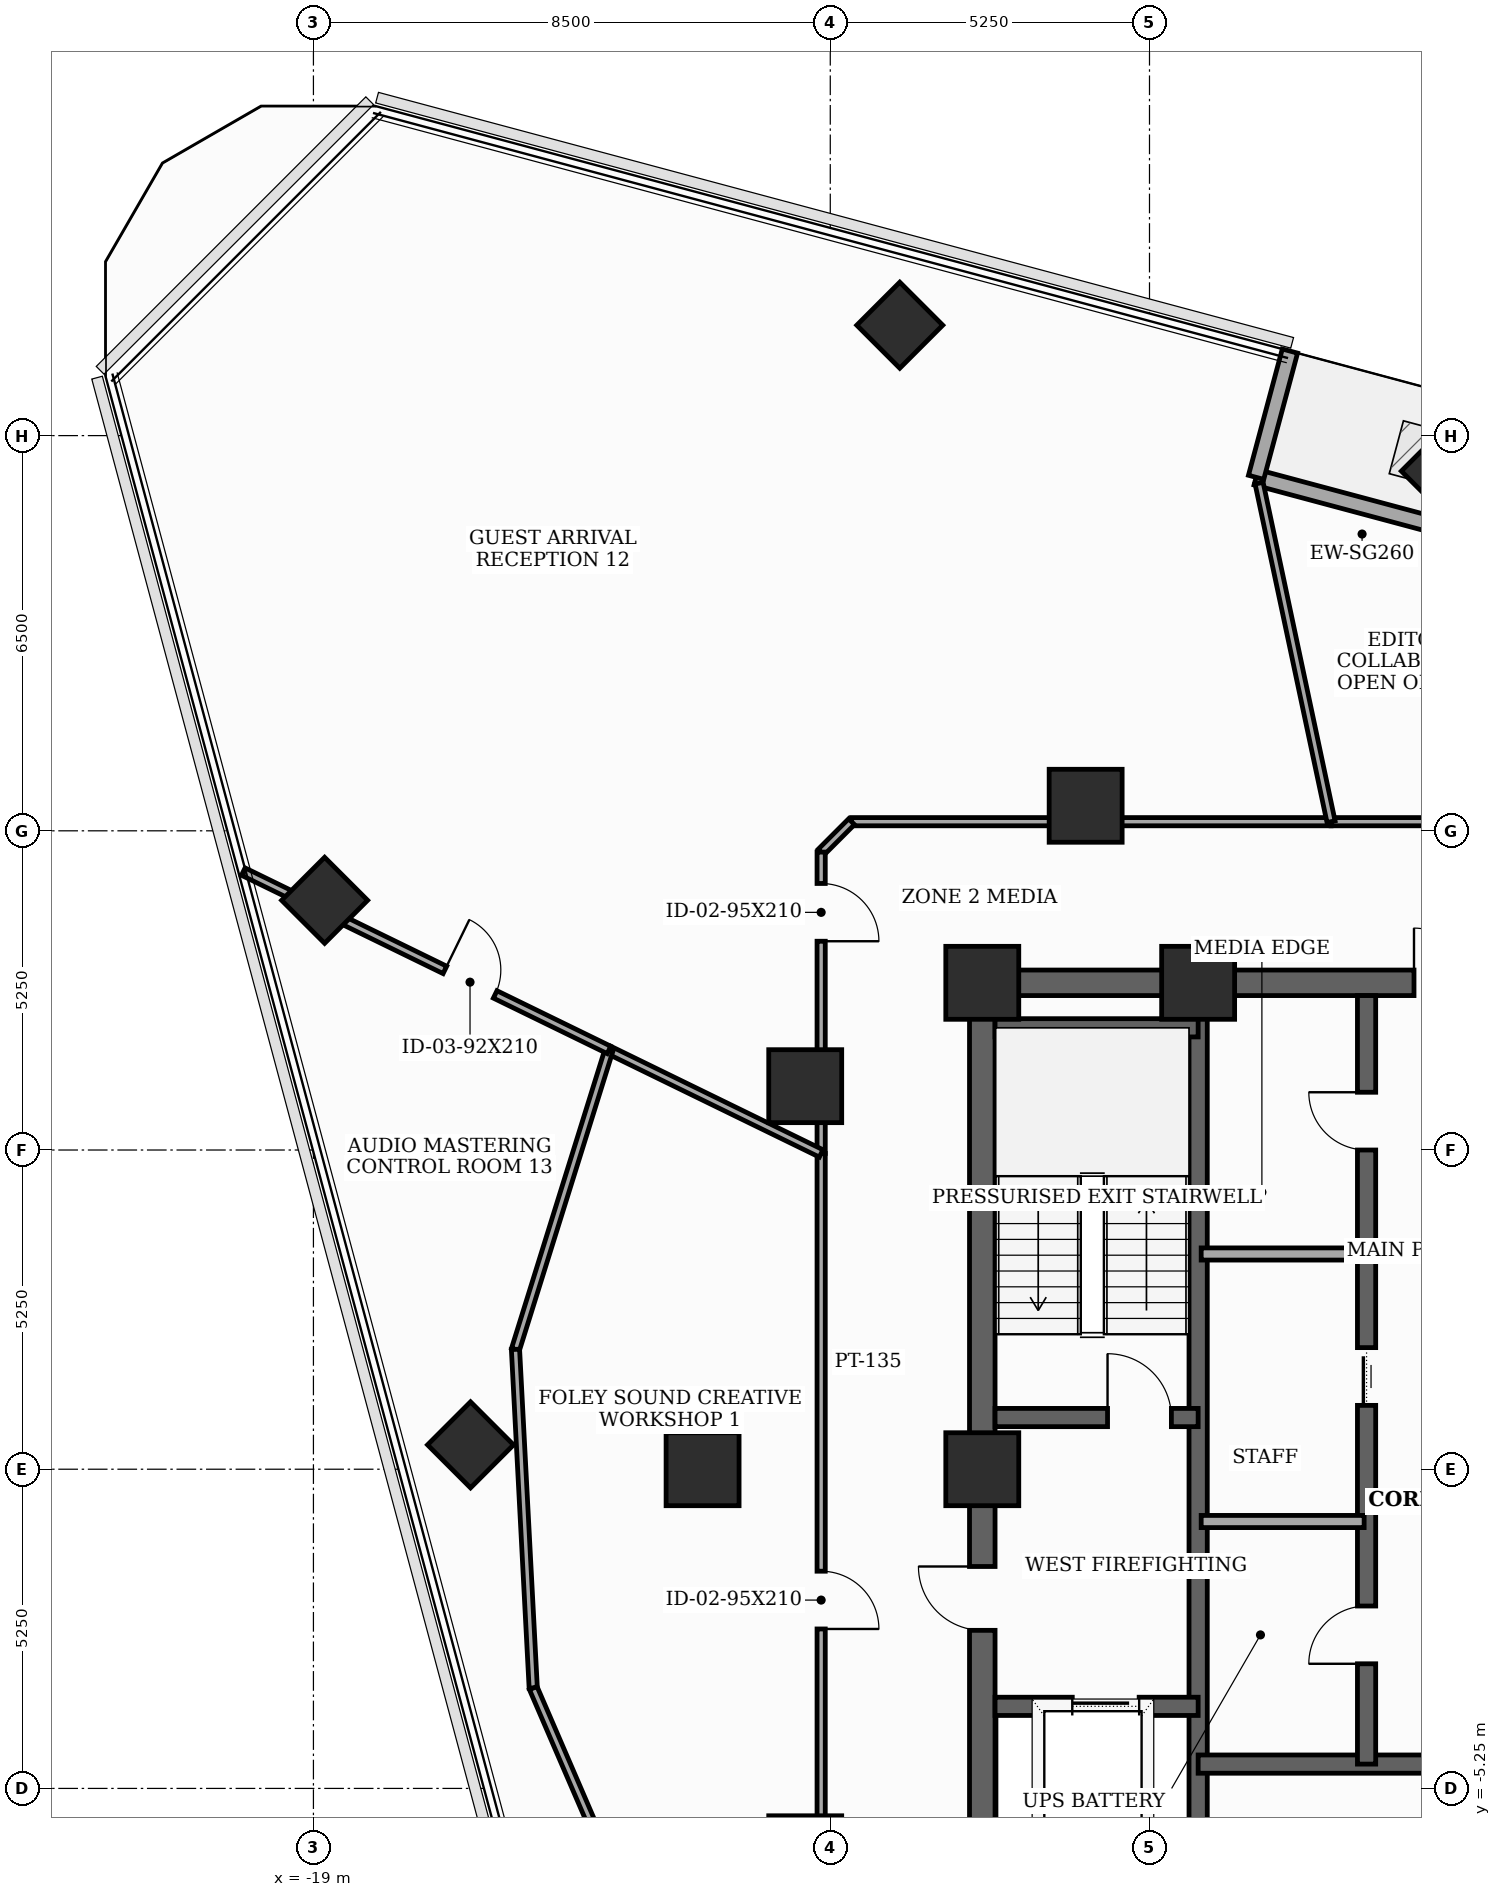
"""IFC4 building model, lengths in metres.
Left out: names, types, materials, properties, quantities, classifications, styles, units other than length and angle.
Written with IfcOpenShell. Run it as: python <this file> out.ifc"""

import sys

from ifc_helpers import new_model, si_unit, direction, frame, frame_2d, origin, origin_2d, place, context, subcontext, project, spatial, rectangle, extrude, element, fill, save


model = new_model("IFC4")
c1 = context("Model", 3, precision=1e-05, world=origin(), true_north=direction((0.0, 1.0)))
c2 = subcontext(c1, "Body", "Model", "MODEL_VIEW")
j1 = project(units=[si_unit("LENGTHUNIT", "METRE"), si_unit("PLANEANGLEUNIT", "RADIAN")], contexts=[c1])
p1 = place(None, origin())
s1 = spatial("IfcSite", under=j1, at=p1, CompositionType="ELEMENT")
p2 = place(p1, origin())
s2 = spatial("IfcBuilding", under=s1, at=p2, CompositionType="ELEMENT")
p3 = place(p2, frame((0.0, 0.0, 191.6)))
s3 = spatial("IfcBuildingStorey", under=s2, at=p3, CompositionType="ELEMENT", Elevation=191.6)
for number, where, z_axis, x_axis in (
    (1, (-4.45, 8.0, 0.0), (0.0, 0.0, 1.0), (1.0, 0.0, 0.0)),
    (2, (-8.0, 8.0, 0.0), (0.0, 0.0, 1.0), (1.0, 0.0, 0.0)),
    (3, (-8.0, 0.0, 0.0), (0.0, 0.0, 1.0), (1.0, 0.0, 0.0)),
    (4, (-6.3, 10.912, 0.0), (0.0, 0.0, 1.0), (1.0, 0.0, 0.0)),
    (5, (-10.912, 6.3, 0.0), (0.0, 0.0, 1.0), (1.0, 0.0, 0.0)),
    (6, (-12.6, 0.0, 0.0), (0.0, 0.0, 1.0), (1.0, 0.0, 0.0)),
    (7, (-10.912, -6.3, 0.0), (0.0, 0.0, 1.0), (1.0, 0.0, 0.0)),
):
    element("IfcColumn", number, at=place(p3, frame(where, z_axis=z_axis, x_axis=x_axis)), inside=s3, PredefinedType="COLUMN", context=c2, shape_type="SweptSolid", body=[
        extrude(rectangle(XDim=1.2, YDim=1.2, at=origin_2d()), origin(), (0.0, 0.0, 1.0), 3.7),
    ])
for number, where, z_axis, x_axis in (
    (8, (-0.401, 16.416, 0.0), (0.0, 0.0, 1.0), (0.707, 0.707, 0.0)),
    (9, (-9.357, 18.816, 0.0), (0.0, 0.0, 1.0), (0.707, 0.707, 0.0)),
    (10, (-18.816, 9.357, 0.0), (0.0, 0.0, 1.0), (0.707, 0.707, 0.0)),
    (11, (-16.416, 0.401, 0.0), (0.0, 0.0, 1.0), (0.707, 0.707, 0.0)),
):
    element("IfcColumn", number, at=place(p3, frame(where, z_axis=z_axis, x_axis=x_axis)), inside=s3, PredefinedType="COLUMN", context=c2, shape_type="SweptSolid", body=[
        extrude(rectangle(XDim=1.0, YDim=1.0, at=origin_2d()), origin(), (0.0, 0.0, 1.0), 3.7),
    ])
p4 = place(p3, frame((6.935, 13.519, 0.0), z_axis=(0.0, 0.0, 1.0), x_axis=(-0.965922825334, 0.258830244561, 0.0)))
e12 = element("IfcWall", 12, at=p4, inside=s3, PredefinedType="SOLIDWALL", context=c2, shape_type="SweptSolid", body=[
    extrude(rectangle(XDim=10.8, YDim=0.26, at=frame_2d((5.4, 0.0))), origin(), (0.0, 0.0, 1.0), 3.5),
])
p5 = place(p4, frame((1.75, 0.0, 0.0)))
e13 = element("IfcOpeningElement", 13, at=p5, cuts=e12, PredefinedType="OPENING", context=c2, shape_type="SweptSolid", body=[
    extrude(rectangle(XDim=1.6, YDim=2.08, at=frame_2d((0.8, 1.04))), frame((0.0, 0.14, 0.0), z_axis=(0.0, -1.0, 0.0), x_axis=(1.0, 0.0, 0.0)), (0.0, 0.0, 1.0), 0.28),
])
p6 = place(p4, frame((5.65, 0.0, 0.85)))
e14 = element("IfcOpeningElement", 14, at=p6, cuts=e12, PredefinedType="OPENING", context=c2, shape_type="SweptSolid", body=[
    extrude(rectangle(XDim=1.3, YDim=1.25, at=frame_2d((0.65, 0.625))), frame((0.0, 0.14, 0.0), z_axis=(0.0, -1.0, 0.0), x_axis=(1.0, 0.0, 0.0)), (0.0, 0.0, 1.0), 0.28),
])
p7 = place(p3, frame((-3.497, 16.314, 0.0), z_axis=(0.0, 0.0, 1.0), x_axis=(0.258800415469, 0.965930817892, 0.0)))
e15 = element("IfcWall", 15, at=p7, inside=s3, PredefinedType="SOLIDWALL", context=c2, shape_type="SweptSolid", body=[
    extrude(rectangle(XDim=2.15, YDim=0.26, at=frame_2d((1.075, 0.0))), origin(), (0.0, 0.0, 1.0), 3.5),
])
p8 = place(p3, frame((-8.0, -8.0, 0.0), z_axis=(0.0, 0.0, 1.0), x_axis=(0.0, 1.0, 0.0)))
e16 = element("IfcWall", 16, at=p8, inside=s3, PredefinedType="SHEAR", context=c2, shape_type="SweptSolid", body=[
    extrude(rectangle(XDim=16.0, YDim=0.42, at=frame_2d((8.0, 0.0))), origin(), (0.0, 0.0, 1.0), 3.5),
])
p9 = place(p8, frame((0.761, 0.0, 0.0)))
e17 = element("IfcOpeningElement", 17, at=p9, cuts=e16, PredefinedType="OPENING", context=c2, shape_type="SweptSolid", body=[
    extrude(rectangle(XDim=0.85, YDim=2.02, at=frame_2d((0.425, 1.01))), frame((0.0, 0.22, 0.0), z_axis=(0.0, -1.0, 0.0), x_axis=(1.0, 0.0, 0.0)), (0.0, 0.0, 1.0), 0.44),
])
p10 = place(p8, frame((5.35, 0.0, 0.0)))
e18 = element("IfcOpeningElement", 18, at=p10, cuts=e16, PredefinedType="OPENING", context=c2, shape_type="SweptSolid", body=[
    extrude(rectangle(XDim=1.05, YDim=2.15, at=frame_2d((0.525, 1.075))), frame((0.0, 0.22, 0.0), z_axis=(0.0, -1.0, 0.0), x_axis=(1.0, 0.0, 0.0)), (0.0, 0.0, 1.0), 0.44),
])
p11 = place(p3, frame((-8.0, 8.0, 0.0), z_axis=(0.0, 0.0, 1.0), x_axis=(1.0, 0.0, 0.0)))
e19 = element("IfcWall", 19, at=p11, inside=s3, PredefinedType="SHEAR", context=c2, shape_type="SweptSolid", body=[
    extrude(rectangle(XDim=16.0, YDim=0.42, at=frame_2d((8.0, 0.0))), origin(), (0.0, 0.0, 1.0), 3.5),
])
p12 = place(p11, frame((7.1, 0.0, 0.0)))
e20 = element("IfcOpeningElement", 20, at=p12, cuts=e19, PredefinedType="OPENING", context=c2, shape_type="SweptSolid", body=[
    extrude(rectangle(XDim=1.8, YDim=2.15, at=frame_2d((0.9, 1.075))), frame((0.0, 0.22, 0.0), z_axis=(0.0, -1.0, 0.0), x_axis=(1.0, 0.0, 0.0)), (0.0, 0.0, 1.0), 0.44),
])
p13 = place(p3, frame((-4.45, -7.79, 0.0), z_axis=(0.0, 0.0, 1.0), x_axis=(0.0, 1.0, 0.0)))
e21 = element("IfcWall", 21, at=p13, inside=s3, PredefinedType="SHEAR", context=c2, shape_type="SweptSolid", body=[
    extrude(rectangle(XDim=15.58, YDim=0.3, at=frame_2d((7.79, 0.0))), origin(), (0.0, 0.0, 1.0), 3.5),
])
p14 = place(p3, frame((-7.79, 0.85, 0.0), z_axis=(0.0, 0.0, 1.0), x_axis=(1.0, 0.0, 0.0)))
e22 = element("IfcWall", 22, at=p14, inside=s3, PredefinedType="SHEAR", context=c2, shape_type="SweptSolid", body=[
    extrude(rectangle(XDim=3.34, YDim=0.3, at=frame_2d((1.67, 0.0))), origin(), (0.0, 0.0, 1.0), 3.5),
])
p15 = place(p14, frame((1.85, 0.0, 0.0)))
e23 = element("IfcOpeningElement", 23, at=p15, cuts=e22, PredefinedType="OPENING", context=c2, shape_type="SweptSolid", body=[
    extrude(rectangle(XDim=1.05, YDim=2.15, at=frame_2d((0.525, 1.075))), frame((0.0, 0.16, 0.0), z_axis=(0.0, -1.0, 0.0), x_axis=(1.0, 0.0, 0.0)), (0.0, 0.0, 1.0), 0.32),
])
p16 = place(p3, frame((-7.79, 7.26, 0.0), z_axis=(0.0, 0.0, 1.0), x_axis=(1.0, 0.0, 0.0)))
e24 = element("IfcWall", 24, at=p16, inside=s3, PredefinedType="SHEAR", context=c2, shape_type="SweptSolid", body=[
    extrude(rectangle(XDim=3.34, YDim=0.3, at=frame_2d((1.67, 0.0))), origin(), (0.0, 0.0, 1.0), 3.5),
])
p17 = place(p3, frame((-7.79, -3.9, 0.0), z_axis=(0.0, 0.0, 1.0), x_axis=(1.0, 0.0, 0.0)))
e25 = element("IfcWall", 25, at=p17, inside=s3, PredefinedType="SHEAR", context=c2, shape_type="SweptSolid", body=[
    extrude(rectangle(XDim=3.34, YDim=0.3, at=frame_2d((1.67, 0.0))), origin(), (0.0, 0.0, 1.0), 3.5),
])
p18 = place(p17, frame((1.27, 0.0, 0.0)))
e26 = element("IfcOpeningElement", 26, at=p18, cuts=e25, PredefinedType="OPENING", context=c2, shape_type="SweptSolid", body=[
    extrude(rectangle(XDim=1.1, YDim=2.1, at=frame_2d((0.55, 1.05))), frame((0.0, 0.16, 0.0), z_axis=(0.0, -1.0, 0.0), x_axis=(1.0, 0.0, 0.0)), (0.0, 0.0, 1.0), 0.32),
])
p19 = place(p3, frame((-4.45, -4.85, 0.0), z_axis=(0.0, 0.0, 1.0), x_axis=(1.0, 0.0, 0.0)))
e27 = element("IfcWall", 27, at=p19, inside=s3, PredefinedType="SHEAR", context=c2, shape_type="SweptSolid", body=[
    extrude(rectangle(XDim=8.9, YDim=0.3, at=frame_2d((4.45, 0.0))), origin(), (0.0, 0.0, 1.0), 3.5),
])
p20 = place(p3, frame((-1.68, -4.85, 0.0), z_axis=(0.0, 0.0, 1.0), x_axis=(0.0, 1.0, 0.0)))
e28 = element("IfcWall", 28, at=p20, inside=s3, PredefinedType="SHEAR", context=c2, shape_type="SweptSolid", body=[
    extrude(rectangle(XDim=12.64, YDim=0.3, at=frame_2d((6.32, 0.0))), origin(), (0.0, 0.0, 1.0), 3.5),
])
p21 = place(p20, frame((1.65, 0.0, 0.0)))
e29 = element("IfcOpeningElement", 29, at=p21, cuts=e28, PredefinedType="OPENING", context=c2, shape_type="SweptSolid", body=[
    extrude(rectangle(XDim=0.95, YDim=2.1, at=frame_2d((0.475, 1.05))), frame((0.0, 0.16, 0.0), z_axis=(0.0, -1.0, 0.0), x_axis=(1.0, 0.0, 0.0)), (0.0, 0.0, 1.0), 0.32),
])
p22 = place(p20, frame((5.9, 0.0, 0.0)))
e30 = element("IfcOpeningElement", 30, at=p22, cuts=e28, PredefinedType="OPENING", context=c2, shape_type="SweptSolid", body=[
    extrude(rectangle(XDim=0.95, YDim=2.1, at=frame_2d((0.475, 1.05))), frame((0.0, 0.16, 0.0), z_axis=(0.0, -1.0, 0.0), x_axis=(1.0, 0.0, 0.0)), (0.0, 0.0, 1.0), 0.32),
])
p23 = place(p20, frame((10.1, 0.0, 0.0)))
e31 = element("IfcOpeningElement", 31, at=p23, cuts=e28, PredefinedType="OPENING", context=c2, shape_type="SweptSolid", body=[
    extrude(rectangle(XDim=0.95, YDim=2.1, at=frame_2d((0.475, 1.05))), frame((0.0, 0.16, 0.0), z_axis=(0.0, -1.0, 0.0), x_axis=(1.0, 0.0, 0.0)), (0.0, 0.0, 1.0), 0.32),
])
for number, where, z_axis, x_axis in (
    (32, (-4.4, -0.86, 0.0), (0.0, 0.0, 1.0), (1.0, 0.0, 0.0)),
    (33, (-4.4, 3.54, 0.0), (0.0, 0.0, 1.0), (1.0, 0.0, 0.0)),
):
    element("IfcWall", number, at=place(p3, frame(where, z_axis=z_axis, x_axis=x_axis)), inside=s3, PredefinedType="SOLIDWALL", context=c2, shape_type="SweptSolid", body=[
        extrude(rectangle(XDim=2.68, YDim=0.2, at=frame_2d((1.34, 0.0))), origin(), (0.0, 0.0, 1.0), 3.5),
    ])
p24 = place(p3, frame((-10.65, 5.194, 0.0), z_axis=(0.0, 0.0, 1.0), x_axis=(0.0, -1.0, 0.0)))
e34 = element("IfcWall", 34, at=p24, inside=s3, PredefinedType="PARTITIONING", context=c2, shape_type="SweptSolid", body=[
    extrude(rectangle(XDim=11.849, YDim=0.135, at=frame_2d((5.925, 0.0))), origin(), (0.0, 0.0, 1.0), 2.885),
])
p25 = place(p24, frame((6.871, 0.0, 0.0)))
e35 = element("IfcOpeningElement", 35, at=p25, cuts=e34, PredefinedType="OPENING", context=c2, shape_type="SweptSolid", body=[
    extrude(rectangle(XDim=0.95, YDim=2.1, at=frame_2d((0.475, 1.05))), frame((0.0, 0.077, 0.0), z_axis=(0.0, -1.0, 0.0), x_axis=(1.0, 0.0, 0.0)), (0.0, 0.0, 1.0), 0.155),
])
p26 = place(p3, frame((4.742, 10.65, 0.0), z_axis=(0.0, 0.0, 1.0), x_axis=(-1.0, 0.0, 0.0)))
e36 = element("IfcWall", 36, at=p26, inside=s3, PredefinedType="PARTITIONING", context=c2, shape_type="SweptSolid", body=[
    extrude(rectangle(XDim=7.006, YDim=0.135, at=frame_2d((3.503, 0.0))), origin(), (0.0, 0.0, 1.0), 2.885),
])
p27 = place(p26, frame((3.028, 0.0, 0.0)))
e37 = element("IfcOpeningElement", 37, at=p27, cuts=e36, PredefinedType="OPENING", context=c2, shape_type="SweptSolid", body=[
    extrude(rectangle(XDim=0.95, YDim=2.1, at=frame_2d((0.475, 1.05))), frame((0.0, 0.077, 0.0), z_axis=(0.0, -1.0, 0.0), x_axis=(1.0, 0.0, 0.0)), (0.0, 0.0, 1.0), 0.155),
])
p28 = place(p3, frame((-2.264, 10.65, 0.0), z_axis=(0.0, 0.0, 1.0), x_axis=(-1.0, 0.0, 0.0)))
e38 = element("IfcWall", 38, at=p28, inside=s3, PredefinedType="PARTITIONING", context=c2, shape_type="SweptSolid", body=[
    extrude(rectangle(XDim=7.886, YDim=0.135, at=frame_2d((3.943, 0.0))), origin(), (0.0, 0.0, 1.0), 2.885),
])
p29 = place(p3, frame((-10.15, 10.65, 0.0), z_axis=(0.0, 0.0, 1.0), x_axis=(-0.707106781187, -0.707106781187, 0.0)))
e39 = element("IfcWall", 39, at=p29, inside=s3, PredefinedType="PARTITIONING", context=c2, shape_type="SweptSolid", body=[
    extrude(rectangle(XDim=0.707, YDim=0.135, at=frame_2d((0.354, 0.0))), origin(), (0.0, 0.0, 1.0), 3.5),
])
p30 = place(p3, frame((-10.65, 10.15, 0.0), z_axis=(0.0, 0.0, 1.0), x_axis=(0.0, -1.0, 0.0)))
e40 = element("IfcWall", 40, at=p30, inside=s3, PredefinedType="PARTITIONING", context=c2, shape_type="SweptSolid", body=[
    extrude(rectangle(XDim=4.956, YDim=0.135, at=frame_2d((2.478, 0.0))), origin(), (0.0, 0.0, 1.0), 2.885),
])
p31 = place(p30, frame((0.516, 0.0, 0.0)))
e41 = element("IfcOpeningElement", 41, at=p31, cuts=e40, PredefinedType="OPENING", context=c2, shape_type="SweptSolid", body=[
    extrude(rectangle(XDim=0.95, YDim=2.1, at=frame_2d((0.475, 1.05))), frame((0.0, 0.077, 0.0), z_axis=(0.0, -1.0, 0.0), x_axis=(1.0, 0.0, 0.0)), (0.0, 0.0, 1.0), 0.155),
])
p32 = place(p3, frame((-10.65, 5.194, 0.0), z_axis=(0.0, 0.0, 1.0), x_axis=(-0.898773885441, 0.438412480261, 0.0)))
e42 = element("IfcWall", 42, at=p32, inside=s3, PredefinedType="PARTITIONING", context=c2, shape_type="SweptSolid", body=[
    extrude(rectangle(XDim=3.882, YDim=0.135, at=frame_2d((1.941, 0.0))), origin(), (0.0, 0.0, 1.0), 2.885),
])
p33 = place(p3, frame((-14.139, 6.896, 0.0), z_axis=(0.0, 0.0, 1.0), x_axis=(-0.298099863076, -0.954534688544, 0.0)))
e43 = element("IfcWall", 43, at=p33, inside=s3, PredefinedType="PARTITIONING", context=c2, shape_type="SweptSolid", body=[
    extrude(rectangle(XDim=5.16, YDim=0.135, at=frame_2d((2.58, 0.0))), origin(), (0.0, 0.0, 1.0), 3.5),
])
p34 = place(p3, frame((-15.677, 1.971, 0.0), z_axis=(0.0, 0.0, 1.0), x_axis=(0.052349772407, -0.998628810584, 0.0)))
e44 = element("IfcWall", 44, at=p34, inside=s3, PredefinedType="PARTITIONING", context=c2, shape_type="SweptSolid", body=[
    extrude(rectangle(XDim=5.578, YDim=0.135, at=frame_2d((2.789, 0.0))), origin(), (0.0, 0.0, 1.0), 2.985),
])
p35 = place(p3, frame((-15.385, -3.599, 0.0), z_axis=(0.0, 0.0, 1.0), x_axis=(0.396191247476, -0.918168010455, 0.0)))
e45 = element("IfcWall", 45, at=p35, inside=s3, PredefinedType="PARTITIONING", context=c2, shape_type="SweptSolid", body=[
    extrude(rectangle(XDim=5.159, YDim=0.135, at=frame_2d((2.58, 0.0))), origin(), (0.0, 0.0, 1.0), 2.985),
])
p36 = place(p3, frame((-3.447, 16.218, 0.0), z_axis=(0.0, 0.0, 1.0), x_axis=(0.207888507592, -0.978152528193, 0.0)))
e46 = element("IfcWall", 46, at=p36, inside=s3, PredefinedType="PARTITIONING", context=c2, shape_type="SweptSolid", body=[
    extrude(rectangle(XDim=5.692, YDim=0.135, at=frame_2d((2.846, 0.0))), origin(), (0.0, 0.0, 1.0), 2.885),
])
p37 = place(p3, frame((-20.154, 9.829, 0.0), z_axis=(0.0, 0.0, 1.0), x_axis=(0.898812268895, -0.43833378296, 0.0)))
e47 = element("IfcWall", 47, at=p37, inside=s3, PredefinedType="PARTITIONING", context=c2, shape_type="SweptSolid", body=[
    extrude(rectangle(XDim=6.692, YDim=0.135, at=frame_2d((3.346, 0.0))), origin(), (0.0, 0.0, 1.0), 2.985),
])
p38 = place(p37, frame((3.689, 0.0, 0.0)))
e48 = element("IfcOpeningElement", 48, at=p38, cuts=e47, PredefinedType="OPENING", context=c2, shape_type="SweptSolid", body=[
    extrude(rectangle(XDim=0.92, YDim=2.1, at=frame_2d((0.46, 1.05))), frame((0.0, 0.077, 0.0), z_axis=(0.0, -1.0, 0.0), x_axis=(1.0, 0.0, 0.0)), (0.0, 0.0, 1.0), 0.155),
])
p39 = place(p10, origin())
e49 = element("IfcDoor", 49, at=p39, inside=s3, OperationType="SINGLE_SWING_RIGHT", PredefinedType="DOOR", context=c2, shape_type="SweptSolid", body=[
    extrude(rectangle(XDim=1.05, YDim=2.15, at=frame_2d((0.525, 1.075))), frame((0.0, 0.025, 0.0), z_axis=(0.0, -1.0, 0.0), x_axis=(1.0, 0.0, 0.0)), (0.0, 0.0, 1.0), 0.05),
])
fill(e18, e49)
p40 = place(p12, origin())
e50 = element("IfcDoor", 50, at=p40, inside=s3, OperationType="DOUBLE_DOOR_SINGLE_SWING", PredefinedType="DOOR", context=c2, shape_type="SweptSolid", body=[
    extrude(rectangle(XDim=1.8, YDim=2.15, at=frame_2d((0.9, 1.075))), frame((0.0, 0.025, 0.0), z_axis=(0.0, -1.0, 0.0), x_axis=(1.0, 0.0, 0.0)), (0.0, 0.0, 1.0), 0.05),
])
fill(e20, e50)
p41 = place(p15, origin())
e51 = element("IfcDoor", 51, at=p41, inside=s3, OperationType="SINGLE_SWING_LEFT", PredefinedType="DOOR", context=c2, shape_type="SweptSolid", body=[
    extrude(rectangle(XDim=1.05, YDim=2.15, at=frame_2d((0.525, 1.075))), frame((0.0, 0.025, 0.0), z_axis=(0.0, -1.0, 0.0), x_axis=(1.0, 0.0, 0.0)), (0.0, 0.0, 1.0), 0.05),
])
fill(e23, e51)
p42 = place(p18, origin())
e52 = element("IfcDoor", 52, at=p42, inside=s3, OperationType="SLIDING_TO_LEFT", PredefinedType="DOOR", context=c2, shape_type="SweptSolid", body=[
    extrude(rectangle(XDim=1.1, YDim=2.1, at=frame_2d((0.55, 1.05))), frame((0.0, 0.025, 0.0), z_axis=(0.0, -1.0, 0.0), x_axis=(1.0, 0.0, 0.0)), (0.0, 0.0, 1.0), 0.05),
])
fill(e26, e52)
p43 = place(p21, origin())
e53 = element("IfcDoor", 53, at=p43, inside=s3, OperationType="SINGLE_SWING_LEFT", PredefinedType="DOOR", context=c2, shape_type="SweptSolid", body=[
    extrude(rectangle(XDim=0.95, YDim=2.1, at=frame_2d((0.475, 1.05))), frame((0.0, 0.025, 0.0), z_axis=(0.0, -1.0, 0.0), x_axis=(1.0, 0.0, 0.0)), (0.0, 0.0, 1.0), 0.05),
])
fill(e29, e53)
p44 = place(p22, origin())
e54 = element("IfcDoor", 54, at=p44, inside=s3, OperationType="SLIDING_TO_LEFT", PredefinedType="DOOR", context=c2, shape_type="SweptSolid", body=[
    extrude(rectangle(XDim=0.95, YDim=2.1, at=frame_2d((0.475, 1.05))), frame((0.0, 0.025, 0.0), z_axis=(0.0, -1.0, 0.0), x_axis=(1.0, 0.0, 0.0)), (0.0, 0.0, 1.0), 0.05),
])
fill(e30, e54)
p45 = place(p23, origin())
e55 = element("IfcDoor", 55, at=p45, inside=s3, OperationType="SINGLE_SWING_RIGHT", PredefinedType="DOOR", context=c2, shape_type="SweptSolid", body=[
    extrude(rectangle(XDim=0.95, YDim=2.1, at=frame_2d((0.475, 1.05))), frame((0.0, 0.025, 0.0), z_axis=(0.0, -1.0, 0.0), x_axis=(1.0, 0.0, 0.0)), (0.0, 0.0, 1.0), 0.05),
])
fill(e31, e55)
p46 = place(p25, origin())
e56 = element("IfcDoor", 56, at=p46, inside=s3, OperationType="SINGLE_SWING_RIGHT", PredefinedType="DOOR", context=c2, shape_type="SweptSolid", body=[
    extrude(rectangle(XDim=0.95, YDim=2.1, at=frame_2d((0.475, 1.05))), frame((0.0, 0.025, 0.0), z_axis=(0.0, -1.0, 0.0), x_axis=(1.0, 0.0, 0.0)), (0.0, 0.0, 1.0), 0.05),
])
fill(e35, e56)
p47 = place(p31, origin())
e57 = element("IfcDoor", 57, at=p47, inside=s3, OperationType="SINGLE_SWING_RIGHT", PredefinedType="DOOR", context=c2, shape_type="SweptSolid", body=[
    extrude(rectangle(XDim=0.95, YDim=2.1, at=frame_2d((0.475, 1.05))), frame((0.0, 0.025, 0.0), z_axis=(0.0, -1.0, 0.0), x_axis=(1.0, 0.0, 0.0)), (0.0, 0.0, 1.0), 0.05),
])
fill(e41, e57)
p48 = place(p38, origin())
e58 = element("IfcDoor", 58, at=p48, inside=s3, OperationType="SINGLE_SWING_LEFT", PredefinedType="DOOR", context=c2, shape_type="SweptSolid", body=[
    extrude(rectangle(XDim=0.92, YDim=2.1, at=frame_2d((0.46, 1.05))), frame((0.0, 0.025, 0.0), z_axis=(0.0, -1.0, 0.0), x_axis=(1.0, 0.0, 0.0)), (0.0, 0.0, 1.0), 0.05),
])
fill(e48, e58)
save(model, sys.argv[1])
